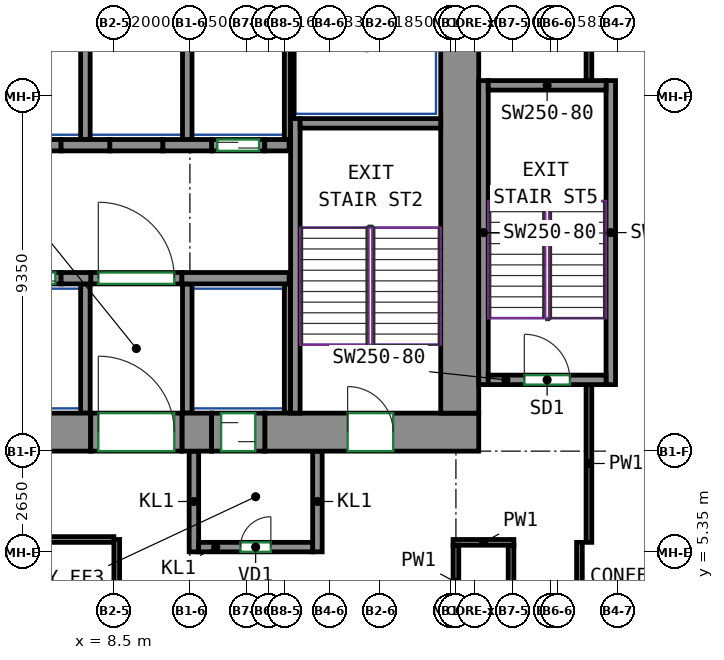
"""IFC4 building model, lengths in metres.
Left out: names, types, materials, properties, quantities, classifications, styles, units other than length and angle.
Written with IfcOpenShell. Run it as: python <this file> out.ifc"""

import sys

from ifc_helpers import new_model, si_unit, direction, frame, frame_2d, origin, place, context, subcontext, project, spatial, rectangle, extrude, source, transform, mapped, element, fill, save


model = new_model("IFC4")
c1 = context("Model", 3, precision=1e-05, world=origin(), true_north=direction((0.0, 1.0)))
c2 = subcontext(c1, "Body", "Model", "MODEL_VIEW")
j1 = project(units=[si_unit("LENGTHUNIT", "METRE"), si_unit("PLANEANGLEUNIT", "RADIAN")], contexts=[c1])
p1 = place(None, origin())
s1 = spatial("IfcSite", under=j1, at=p1, CompositionType="ELEMENT")
p2 = place(p1, origin())
s2 = spatial("IfcBuilding", under=s1, at=p2, CompositionType="ELEMENT")
p3 = place(p2, frame((0.0, 0.0, 55.0)))
s3 = spatial("IfcBuildingStorey", under=s2, at=p3, CompositionType="ELEMENT", Elevation=55.0)
m1 = source(origin(), c2, "Body", "SweptSolid", [
    extrude(rectangle(XDim=14.18, YDim=1.0, at=frame_2d((7.09, 0.0))), origin(), (0.0, 0.0, 1.0), 3.6),
])
p4 = place(p3, frame((-6.29, 8.5, 0.0), z_axis=(0.0, 0.0, 1.0), x_axis=(1.0, 0.0, 0.0)))
e1 = element("IfcWall", 1, at=p4, inside=s3, PredefinedType="SHEAR", context=c2, shape_type="MappedRepresentation", body=[
    mapped(m1, transform((0.0, 0.0, 0.0))),
])
m2 = source(origin(), c2, "Body", "SweptSolid", [
    extrude(rectangle(XDim=0.78, YDim=1.0, at=frame_2d((0.39, 0.0))), origin(), (0.0, 0.0, 1.0), 3.6),
])
p5 = place(p3, frame((10.29, 8.5, 0.0), z_axis=(0.0, 0.0, 1.0), x_axis=(1.0, 0.0, 0.0)))
e2 = element("IfcWall", 2, at=p5, inside=s3, PredefinedType="SHEAR", context=c2, shape_type="MappedRepresentation", body=[
    mapped(m2, transform((0.0, 0.0, 0.0))),
])
m3 = source(origin(), c2, "Body", "SweptSolid", [
    extrude(rectangle(XDim=5.63, YDim=1.0, at=frame_2d((2.815, 0.0))), origin(), (0.0, 0.0, 1.0), 3.6),
])
p6 = place(p3, frame((12.47, 8.5, 0.0), z_axis=(0.0, 0.0, 1.0), x_axis=(1.0, 0.0, 0.0)))
e3 = element("IfcWall", 3, at=p6, inside=s3, PredefinedType="SHEAR", context=c2, shape_type="MappedRepresentation", body=[
    mapped(m3, transform((0.0, 0.0, 0.0))),
])
p7 = place(p6, frame((2.18, 0.0, 0.0)))
e4 = element("IfcOpeningElement", 4, at=p7, cuts=e3, PredefinedType="OPENING", context=c2, shape_type="SweptSolid", body=[
    extrude(rectangle(XDim=1.2, YDim=2.1, at=frame_2d((0.6, 1.05))), frame((0.0, 0.51, 0.0), z_axis=(0.0, -1.0, 0.0), x_axis=(1.0, 0.0, 0.0)), (0.0, 0.0, 1.0), 1.02),
])
m4 = source(origin(), c2, "Body", "SweptSolid", [
    extrude(rectangle(XDim=12.0, YDim=1.0, at=frame_2d((6.0, 0.0))), origin(), (0.0, 0.0, 1.0), 3.6),
])
p8 = place(p3, frame((17.6, 9.0, 0.0), z_axis=(0.0, 0.0, 1.0), x_axis=(0.0, 1.0, 0.0)))
e5 = element("IfcWall", 5, at=p8, inside=s3, PredefinedType="SHEAR", context=c2, shape_type="MappedRepresentation", body=[
    mapped(m4, transform((0.0, 0.0, 0.0))),
])
m5 = source(origin(), c2, "Body", "SweptSolid", [
    extrude(rectangle(XDim=7.75, YDim=0.25, at=frame_2d((3.875, 0.0))), origin(), (0.0, 0.0, 1.0), 3.6),
])
p9 = place(p3, frame((13.275, 9.0, 0.0), z_axis=(0.0, 0.0, 1.0), x_axis=(0.0, 1.0, 0.0)))
e6 = element("IfcWall", 6, at=p9, inside=s3, PredefinedType="SHEAR", context=c2, shape_type="MappedRepresentation", body=[
    mapped(m5, transform((0.0, 0.0, 0.0))),
])
m6 = source(origin(), c2, "Body", "SweptSolid", [
    extrude(rectangle(XDim=3.7, YDim=0.25, at=frame_2d((1.85, 0.0))), origin(), (0.0, 0.0, 1.0), 3.6),
])
p10 = place(p3, frame((13.4, 16.625, 0.0), z_axis=(0.0, 0.0, 1.0), x_axis=(1.0, 0.0, 0.0)))
e7 = element("IfcWall", 7, at=p10, inside=s3, PredefinedType="SHEAR", context=c2, shape_type="MappedRepresentation", body=[
    mapped(m6, transform((0.0, 0.0, 0.0))),
])
m7 = source(origin(), c2, "Body", "SweptSolid", [
    extrude(rectangle(XDim=8.0, YDim=0.25, at=frame_2d((4.0, 0.0))), origin(), (0.0, 0.0, 1.0), 3.6),
])
for number, where, z_axis, x_axis in (
    (8, (18.225, 9.75, 0.0), (0.0, 0.0, 1.0), (0.0, 1.0, 0.0)),
    (9, (21.575, 9.75, 0.0), (0.0, 0.0, 1.0), (0.0, 1.0, 0.0)),
):
    element("IfcWall", number, at=place(p3, frame(where, z_axis=z_axis, x_axis=x_axis)), inside=s3, PredefinedType="SHEAR", context=c2, shape_type="MappedRepresentation", body=[
        mapped(m7, transform((0.0, 0.0, 0.0))),
    ])
m8 = source(origin(), c2, "Body", "SweptSolid", [
    extrude(rectangle(XDim=3.1, YDim=0.25, at=frame_2d((1.55, 0.0))), origin(), (0.0, 0.0, 1.0), 3.6),
])
p11 = place(p3, frame((18.35, 9.875, 0.0), z_axis=(0.0, 0.0, 1.0), x_axis=(1.0, 0.0, 0.0)))
e10 = element("IfcWall", 10, at=p11, inside=s3, PredefinedType="SHEAR", context=c2, shape_type="MappedRepresentation", body=[
    mapped(m8, transform((0.0, 0.0, 0.0))),
])
p12 = place(p11, frame((0.95, 0.0, 0.0)))
e11 = element("IfcOpeningElement", 11, at=p12, cuts=e10, PredefinedType="OPENING", context=c2, shape_type="SweptSolid", body=[
    extrude(rectangle(XDim=1.2, YDim=2.1, at=frame_2d((0.6, 1.05))), frame((0.0, 0.135, 0.0), z_axis=(0.0, -1.0, 0.0), x_axis=(1.0, 0.0, 0.0)), (0.0, 0.0, 1.0), 0.27),
])
p13 = place(p3, frame((18.35, 17.625, 0.0), z_axis=(0.0, 0.0, 1.0), x_axis=(1.0, 0.0, 0.0)))
e12 = element("IfcWall", 12, at=p13, inside=s3, PredefinedType="SHEAR", context=c2, shape_type="MappedRepresentation", body=[
    mapped(m8, transform((0.0, 0.0, 0.0))),
])
m9 = source(origin(), c2, "Body", "SweptSolid", [
    extrude(rectangle(XDim=0.78, YDim=0.3, at=frame_2d((0.39, 0.0))), origin(), (0.0, 0.0, 1.0), 3.6),
])
p14 = place(p3, frame((7.11, 12.55, 0.0), z_axis=(0.0, 0.0, 1.0), x_axis=(1.0, 0.0, 0.0)))
e13 = element("IfcWall", 13, at=p14, inside=s3, PredefinedType="SHEAR", context=c2, shape_type="MappedRepresentation", body=[
    mapped(m9, transform((0.0, 0.0, 0.0))),
])
m10 = source(origin(), c2, "Body", "SweptSolid", [
    extrude(rectangle(XDim=2.82, YDim=0.3, at=frame_2d((1.41, 0.0))), origin(), (0.0, 0.0, 1.0), 3.6),
])
p15 = place(p3, frame((10.29, 12.55, 0.0), z_axis=(0.0, 0.0, 1.0), x_axis=(1.0, 0.0, 0.0)))
e14 = element("IfcWall", 14, at=p15, inside=s3, PredefinedType="SHEAR", context=c2, shape_type="MappedRepresentation", body=[
    mapped(m10, transform((0.0, 0.0, 0.0))),
])
m11 = source(origin(), c2, "Body", "SweptSolid", [
    extrude(rectangle(XDim=1.28, YDim=0.3, at=frame_2d((0.64, 0.0))), origin(), (0.0, 0.0, 1.0), 3.6),
])
p16 = place(p3, frame((7.11, 16.05, 0.0), z_axis=(0.0, 0.0, 1.0), x_axis=(1.0, 0.0, 0.0)))
e15 = element("IfcWall", 15, at=p16, inside=s3, PredefinedType="SHEAR", context=c2, shape_type="MappedRepresentation", body=[
    mapped(m11, transform((0.0, 0.0, 0.0))),
])
m12 = source(origin(), c2, "Body", "SweptSolid", [
    extrude(rectangle(XDim=1.28, YDim=0.3, at=frame_2d((0.64, 0.0))), origin(), (0.0, 0.0, 1.0), 3.6),
])
p17 = place(p3, frame((9.79, 16.05, 0.0), z_axis=(0.0, 0.0, 1.0), x_axis=(1.0, 0.0, 0.0)))
e16 = element("IfcWall", 16, at=p17, inside=s3, PredefinedType="SHEAR", context=c2, shape_type="MappedRepresentation", body=[
    mapped(m12, transform((0.0, 0.0, 0.0))),
])
m13 = source(origin(), c2, "Body", "SweptSolid", [
    extrude(rectangle(XDim=0.64, YDim=0.3, at=frame_2d((0.32, 0.0))), origin(), (0.0, 0.0, 1.0), 3.6),
])
p18 = place(p3, frame((12.47, 16.05, 0.0), z_axis=(0.0, 0.0, 1.0), x_axis=(1.0, 0.0, 0.0)))
e17 = element("IfcWall", 17, at=p18, inside=s3, PredefinedType="SHEAR", context=c2, shape_type="MappedRepresentation", body=[
    mapped(m13, transform((0.0, 0.0, 0.0))),
])
m14 = source(origin(), c2, "Body", "SweptSolid", [
    extrude(rectangle(XDim=1.4, YDim=0.3, at=frame_2d((0.7, 0.0))), origin(), (0.0, 0.0, 1.0), 3.6),
])
p19 = place(p3, frame((5.71, 12.55, 0.0), z_axis=(0.0, 0.0, 1.0), x_axis=(1.0, 0.0, 0.0)))
e18 = element("IfcWall", 18, at=p19, inside=s3, PredefinedType="PARTITIONING", context=c2, shape_type="MappedRepresentation", body=[
    mapped(m14, transform((0.0, 0.0, 0.0))),
])
p20 = place(p19, frame((0.15, 0.0, 0.0)))
e19 = element("IfcOpeningElement", 19, at=p20, cuts=e18, PredefinedType="OPENING", context=c2, shape_type="SweptSolid", body=[
    extrude(rectangle(XDim=1.1, YDim=2.1, at=frame_2d((0.55, 1.05))), frame((0.0, 0.16, 0.0), z_axis=(0.0, -1.0, 0.0), x_axis=(1.0, 0.0, 0.0)), (0.0, 0.0, 1.0), 0.32),
])
m15 = source(origin(), c2, "Body", "SweptSolid", [
    extrude(rectangle(XDim=1.4, YDim=0.3, at=frame_2d((0.7, 0.0))), origin(), (0.0, 0.0, 1.0), 3.6),
])
p21 = place(p3, frame((11.07, 16.05, 0.0), z_axis=(0.0, 0.0, 1.0), x_axis=(1.0, 0.0, 0.0)))
e20 = element("IfcWall", 20, at=p21, inside=s3, PredefinedType="PARTITIONING", context=c2, shape_type="MappedRepresentation", body=[
    mapped(m15, transform((0.0, 0.0, 0.0))),
])
p22 = place(p21, frame((0.15, 0.0, 0.0)))
e21 = element("IfcOpeningElement", 21, at=p22, cuts=e20, PredefinedType="OPENING", context=c2, shape_type="SweptSolid", body=[
    extrude(rectangle(XDim=1.1, YDim=2.1, at=frame_2d((0.55, 1.05))), frame((0.0, 0.16, 0.0), z_axis=(0.0, -1.0, 0.0), x_axis=(1.0, 0.0, 0.0)), (0.0, 0.0, 1.0), 0.32),
])
m16 = source(origin(), c2, "Body", "SweptSolid", [
    extrude(rectangle(XDim=2.4, YDim=0.3, at=frame_2d((1.2, 0.0))), origin(), (0.0, 0.0, 1.0), 3.6),
])
p23 = place(p3, frame((7.89, 12.55, 0.0), z_axis=(0.0, 0.0, 1.0), x_axis=(1.0, 0.0, 0.0)))
e22 = element("IfcWall", 22, at=p23, inside=s3, PredefinedType="PARTITIONING", context=c2, shape_type="MappedRepresentation", body=[
    mapped(m16, transform((0.0, 0.0, 0.0))),
])
p24 = place(p23, frame((0.2, 0.0, 0.0)))
e23 = element("IfcOpeningElement", 23, at=p24, cuts=e22, PredefinedType="OPENING", context=c2, shape_type="SweptSolid", body=[
    extrude(rectangle(XDim=2.0, YDim=2.1, at=frame_2d((1.0, 1.05))), frame((0.0, 0.16, 0.0), z_axis=(0.0, -1.0, 0.0), x_axis=(1.0, 0.0, 0.0)), (0.0, 0.0, 1.0), 0.32),
])
for number, where, z_axis, x_axis in (
    (24, (5.71, 16.05, 0.0), (0.0, 0.0, 1.0), (1.0, 0.0, 0.0)),
    (25, (8.39, 16.05, 0.0), (0.0, 0.0, 1.0), (1.0, 0.0, 0.0)),
):
    element("IfcWall", number, at=place(p3, frame(where, z_axis=z_axis, x_axis=x_axis)), inside=s3, PredefinedType="PARTITIONING", context=c2, shape_type="MappedRepresentation", body=[
        mapped(m14, transform((0.0, 0.0, 0.0))),
    ])
m17 = source(origin(), c2, "Body", "SweptSolid", [
    extrude(rectangle(XDim=2.65, YDim=0.25, at=frame_2d((1.325, 0.0))), origin(), (0.0, 0.0, 1.0), 3.6),
])
for number, where, z_axis, x_axis in (
    (26, (10.605, 5.35, 0.0), (0.0, 0.0, 1.0), (0.0, 1.0, 0.0)),
    (27, (13.855, 5.35, 0.0), (0.0, 0.0, 1.0), (0.0, 1.0, 0.0)),
):
    element("IfcWall", number, at=place(p3, frame(where, z_axis=z_axis, x_axis=x_axis)), inside=s3, PredefinedType="PARTITIONING", context=c2, shape_type="MappedRepresentation", body=[
        mapped(m17, transform((0.0, 0.0, 0.0))),
    ])
m18 = source(origin(), c2, "Body", "SweptSolid", [
    extrude(rectangle(XDim=3.0, YDim=0.25, at=frame_2d((1.5, 0.0))), origin(), (0.0, 0.0, 1.0), 3.6),
])
p25 = place(p3, frame((10.73, 5.475, 0.0), z_axis=(0.0, 0.0, 1.0), x_axis=(1.0, 0.0, 0.0)))
e28 = element("IfcWall", 28, at=p25, inside=s3, PredefinedType="PARTITIONING", context=c2, shape_type="MappedRepresentation", body=[
    mapped(m18, transform((0.0, 0.0, 0.0))),
])
p26 = place(p25, frame((1.1, 0.0, 0.0)))
e29 = element("IfcOpeningElement", 29, at=p26, cuts=e28, PredefinedType="OPENING", context=c2, shape_type="SweptSolid", body=[
    extrude(rectangle(XDim=0.8, YDim=2.0, at=frame_2d((0.4, 1.0))), frame((0.0, 0.135, 0.0), z_axis=(0.0, -1.0, 0.0), x_axis=(1.0, 0.0, 0.0)), (0.0, 0.0, 1.0), 0.27),
])
m19 = source(origin(), c2, "Body", "SweptSolid", [
    extrude(rectangle(XDim=3.275, YDim=0.165, at=frame_2d((1.638, 0.0))), origin(), (0.0, 0.0, 1.0), 3.6),
])
p27 = place(p3, frame((13.067, 16.2, 0.0), z_axis=(0.0, 0.0, 1.0), x_axis=(0.0, 1.0, 0.0)))
e30 = element("IfcWall", 30, at=p27, inside=s3, PredefinedType="PARTITIONING", context=c2, shape_type="MappedRepresentation", body=[
    mapped(m19, transform((0.0, 0.0, 0.0))),
])
m20 = source(origin(), c2, "Body", "SweptSolid", [
    extrude(rectangle(XDim=3.275, YDim=0.25, at=frame_2d((1.638, 0.0))), origin(), (0.0, 0.0, 1.0), 3.6),
])
p28 = place(p3, frame((10.43, 16.2, 0.0), z_axis=(0.0, 0.0, 1.0), x_axis=(0.0, 1.0, 0.0)))
e31 = element("IfcWall", 31, at=p28, inside=s3, PredefinedType="PARTITIONING", context=c2, shape_type="MappedRepresentation", body=[
    mapped(m20, transform((0.0, 0.0, 0.0))),
])
m21 = source(origin(), c2, "Body", "SweptSolid", [
    extrude(rectangle(XDim=2.725, YDim=0.085, at=frame_2d((1.363, 0.0))), origin(), (0.0, 0.0, 1.0), 3.6),
])
p29 = place(p3, frame((13.192, 16.75, 0.0), z_axis=(0.0, 0.0, 1.0), x_axis=(0.0, 1.0, 0.0)))
e32 = element("IfcWall", 32, at=p29, inside=s3, PredefinedType="PARTITIONING", context=c2, shape_type="MappedRepresentation", body=[
    mapped(m21, transform((0.0, 0.0, 0.0))),
])
p30 = place(p3, frame((7.75, 16.2, 0.0), z_axis=(0.0, 0.0, 1.0), x_axis=(0.0, 1.0, 0.0)))
e33 = element("IfcWall", 33, at=p30, inside=s3, PredefinedType="PARTITIONING", context=c2, shape_type="MappedRepresentation", body=[
    mapped(m20, transform((0.0, 0.0, 0.0))),
])
m22 = source(origin(), c2, "Body", "SweptSolid", [
    extrude(rectangle(XDim=3.4, YDim=0.25, at=frame_2d((1.7, 0.0))), origin(), (0.0, 0.0, 1.0), 3.6),
])
p31 = place(p3, frame((10.43, 9.0, 0.0), z_axis=(0.0, 0.0, 1.0), x_axis=(0.0, 1.0, 0.0)))
e34 = element("IfcWall", 34, at=p31, inside=s3, PredefinedType="PARTITIONING", context=c2, shape_type="MappedRepresentation", body=[
    mapped(m22, transform((0.0, 0.0, 0.0))),
])
m23 = source(origin(), c2, "Body", "SweptSolid", [
    extrude(rectangle(XDim=3.4, YDim=0.165, at=frame_2d((1.7, 0.0))), origin(), (0.0, 0.0, 1.0), 3.6),
])
p32 = place(p3, frame((13.067, 9.0, 0.0), z_axis=(0.0, 0.0, 1.0), x_axis=(0.0, 1.0, 0.0)))
e35 = element("IfcWall", 35, at=p32, inside=s3, PredefinedType="PARTITIONING", context=c2, shape_type="MappedRepresentation", body=[
    mapped(m23, transform((0.0, 0.0, 0.0))),
])
p33 = place(p3, frame((7.75, 9.0, 0.0), z_axis=(0.0, 0.0, 1.0), x_axis=(0.0, 1.0, 0.0)))
e36 = element("IfcWall", 36, at=p33, inside=s3, PredefinedType="PARTITIONING", context=c2, shape_type="MappedRepresentation", body=[
    mapped(m22, transform((0.0, 0.0, 0.0))),
])
m24 = source(origin(), c2, "Body", "SweptSolid", [
    extrude(rectangle(XDim=2.4, YDim=1.0, at=frame_2d((1.2, 0.0))), origin(), (0.0, 0.0, 1.0), 2.7),
])
p34 = place(p3, frame((7.89, 8.5, 0.0), z_axis=(0.0, 0.0, 1.0), x_axis=(1.0, 0.0, 0.0)))
e37 = element("IfcWall", 37, at=p34, inside=s3, PredefinedType="PARTITIONING", context=c2, shape_type="MappedRepresentation", body=[
    mapped(m24, transform((0.0, 0.0, 0.0))),
])
p35 = place(p34, frame((0.2, 0.0, 0.0)))
e38 = element("IfcOpeningElement", 38, at=p35, cuts=e37, PredefinedType="OPENING", context=c2, shape_type="SweptSolid", body=[
    extrude(rectangle(XDim=2.0, YDim=2.1, at=frame_2d((1.0, 1.05))), frame((0.0, 0.51, 0.0), z_axis=(0.0, -1.0, 0.0), x_axis=(1.0, 0.0, 0.0)), (0.0, 0.0, 1.0), 1.02),
])
m25 = source(origin(), c2, "Body", "SweptSolid", [
    extrude(rectangle(XDim=1.4, YDim=1.0, at=frame_2d((0.7, 0.0))), origin(), (0.0, 0.0, 1.0), 2.7),
])
p36 = place(p3, frame((11.07, 8.5, 0.0), z_axis=(0.0, 0.0, 1.0), x_axis=(1.0, 0.0, 0.0)))
e39 = element("IfcWall", 39, at=p36, inside=s3, PredefinedType="PARTITIONING", context=c2, shape_type="MappedRepresentation", body=[
    mapped(m25, transform((0.0, 0.0, 0.0))),
])
p37 = place(p36, frame((0.25, 0.0, 0.0)))
e40 = element("IfcOpeningElement", 40, at=p37, cuts=e39, PredefinedType="OPENING", context=c2, shape_type="SweptSolid", body=[
    extrude(rectangle(XDim=0.9, YDim=2.1, at=frame_2d((0.45, 1.05))), frame((0.0, 0.51, 0.0), z_axis=(0.0, -1.0, 0.0), x_axis=(1.0, 0.0, 0.0)), (0.0, 0.0, 1.0), 1.02),
])
p38 = place(p3, frame((20.75, -7.75, 0.0), z_axis=(0.0, 0.0, 1.0), x_axis=(0.0, 1.0, 0.0)))
e41 = element("IfcWall", 41, at=p38, inside=s3, PredefinedType="PARTITIONING", context=c2, shape_type="SweptSolid", body=[
    extrude(rectangle(XDim=13.35, YDim=0.15, at=frame_2d((6.675, 0.0))), origin(), (0.0, 0.0, 1.0), 3.6),
])
p39 = place(p38, frame((6.744, 0.0, 0.0)))
e42 = element("IfcOpeningElement", 42, at=p39, cuts=e41, PredefinedType="OPENING", context=c2, shape_type="SweptSolid", body=[
    extrude(rectangle(XDim=0.9, YDim=2.1, at=frame_2d((0.45, 1.05))), frame((0.0, 0.085, 0.0), z_axis=(0.0, -1.0, 0.0), x_axis=(1.0, 0.0, 0.0)), (0.0, 0.0, 1.0), 0.17),
])
p40 = place(p3, frame((18.95, -0.91, 0.0), z_axis=(0.0, 0.0, 1.0), x_axis=(0.0, 1.0, 0.0)))
e43 = element("IfcWall", 43, at=p40, inside=s3, PredefinedType="PARTITIONING", context=c2, shape_type="SweptSolid", body=[
    extrude(rectangle(XDim=6.435, YDim=0.15, at=frame_2d((3.217, 0.0))), origin(), (0.0, 0.0, 1.0), 3.6),
])
p41 = place(p3, frame((17.425, 5.6, 0.0), z_axis=(0.0, 0.0, 1.0), x_axis=(1.0, 0.0, 0.0)))
e44 = element("IfcWall", 44, at=p41, inside=s3, PredefinedType="PARTITIONING", context=c2, shape_type="SweptSolid", body=[
    extrude(rectangle(XDim=1.6, YDim=0.15, at=frame_2d((0.8, 0.0))), origin(), (0.0, 0.0, 1.0), 3.6),
])
p42 = place(p3, frame((17.5, 3.575, 0.0), z_axis=(0.0, 0.0, 1.0), x_axis=(0.0, 1.0, 0.0)))
e45 = element("IfcWall", 45, at=p42, inside=s3, PredefinedType="PARTITIONING", context=c2, shape_type="SweptSolid", body=[
    extrude(rectangle(XDim=1.95, YDim=0.15, at=frame_2d((0.975, 0.0))), origin(), (0.0, 0.0, 1.0), 3.6),
])
p43 = place(p3, frame((21.0, 17.75, 0.0), z_axis=(0.0, 0.0, 1.0), x_axis=(0.0, 1.0, 0.0)))
e46 = element("IfcWall", 46, at=p43, inside=s3, PredefinedType="PARTITIONING", context=c2, shape_type="SweptSolid", body=[
    extrude(rectangle(XDim=4.16, YDim=0.15, at=frame_2d((2.08, 0.0))), origin(), (0.0, 0.0, 1.0), 3.6),
])
p44 = place(p3, frame((21.0, 5.6, 0.0), z_axis=(0.0, 0.0, 1.0), x_axis=(0.0, 1.0, 0.0)))
e47 = element("IfcWall", 47, at=p44, inside=s3, PredefinedType="PARTITIONING", context=c2, shape_type="SweptSolid", body=[
    extrude(rectangle(XDim=4.15, YDim=0.15, at=frame_2d((2.075, 0.0))), origin(), (0.0, 0.0, 1.0), 3.6),
])
p45 = place(p3, frame((-6.575, 5.675, 0.0), z_axis=(0.0, 0.0, 1.0), x_axis=(1.0, 0.0, 0.0)))
e48 = element("IfcWall", 48, at=p45, inside=s3, PredefinedType="PARTITIONING", context=c2, shape_type="SweptSolid", body=[
    extrude(rectangle(XDim=15.075, YDim=0.15, at=frame_2d((7.538, 0.0))), origin(), (0.0, 0.0, 1.0), 3.6),
])
p46 = place(p3, frame((8.575, 5.675, 0.0), z_axis=(0.0, 0.0, 1.0), x_axis=(0.0, -1.0, 0.0)))
e49 = element("IfcWall", 49, at=p46, inside=s3, PredefinedType="PARTITIONING", context=c2, shape_type="SweptSolid", body=[
    extrude(rectangle(XDim=15.15, YDim=0.15, at=frame_2d((7.575, 0.0))), origin(), (0.0, 0.0, 1.0), 3.6),
])
p47 = place(p24, origin())
e50 = element("IfcDoor", 50, at=p47, inside=s3, OperationType="DOUBLE_DOOR_SINGLE_SWING", PredefinedType="DOOR", context=c2, shape_type="SweptSolid", body=[
    extrude(rectangle(XDim=2.0, YDim=2.1, at=frame_2d((1.0, 1.05))), frame((0.0, 0.025, 0.0), z_axis=(0.0, -1.0, 0.0), x_axis=(1.0, 0.0, 0.0)), (0.0, 0.0, 1.0), 0.05),
])
fill(e23, e50)
p48 = place(p35, origin())
e51 = element("IfcDoor", 51, at=p48, inside=s3, OperationType="DOUBLE_DOOR_SINGLE_SWING", PredefinedType="DOOR", context=c2, shape_type="SweptSolid", body=[
    extrude(rectangle(XDim=2.0, YDim=2.1, at=frame_2d((1.0, 1.05))), frame((0.0, 0.405, 0.0), z_axis=(0.0, -1.0, 0.0), x_axis=(1.0, 0.0, 0.0)), (0.0, 0.0, 1.0), 0.05),
])
fill(e38, e51)
p49 = place(p26, origin())
e52 = element("IfcDoor", 52, at=p49, inside=s3, OperationType="SINGLE_SWING_RIGHT", PredefinedType="DOOR", context=c2, shape_type="SweptSolid", body=[
    extrude(rectangle(XDim=0.8, YDim=2.0, at=frame_2d((0.4, 1.0))), frame((0.0, 0.025, 0.0), z_axis=(0.0, -1.0, 0.0), x_axis=(1.0, 0.0, 0.0)), (0.0, 0.0, 1.0), 0.05),
])
fill(e29, e52)
p50 = place(p37, origin())
e53 = element("IfcDoor", 53, at=p50, inside=s3, OperationType="SLIDING_TO_LEFT", PredefinedType="DOOR", context=c2, shape_type="SweptSolid", body=[
    extrude(rectangle(XDim=0.9, YDim=2.1, at=frame_2d((0.45, 1.05))), frame((0.0, 0.405, 0.0), z_axis=(0.0, -1.0, 0.0), x_axis=(1.0, 0.0, 0.0)), (0.0, 0.0, 1.0), 0.05),
])
fill(e40, e53)
p51 = place(p20, origin())
e54 = element("IfcDoor", 54, at=p51, inside=s3, OperationType="DOUBLE_DOOR_SLIDING", PredefinedType="DOOR", context=c2, shape_type="SweptSolid", body=[
    extrude(rectangle(XDim=1.1, YDim=2.1, at=frame_2d((0.55, 1.05))), frame((0.0, 0.025, 0.0), z_axis=(0.0, -1.0, 0.0), x_axis=(1.0, 0.0, 0.0)), (0.0, 0.0, 1.0), 0.05),
])
fill(e19, e54)
p52 = place(p22, origin())
e55 = element("IfcDoor", 55, at=p52, inside=s3, OperationType="DOUBLE_DOOR_SLIDING", PredefinedType="DOOR", context=c2, shape_type="SweptSolid", body=[
    extrude(rectangle(XDim=1.1, YDim=2.1, at=frame_2d((0.55, 1.05))), frame((0.0, 0.025, 0.0), z_axis=(0.0, -1.0, 0.0), x_axis=(1.0, 0.0, 0.0)), (0.0, 0.0, 1.0), 0.05),
])
fill(e21, e55)
p53 = place(p7, origin())
e56 = element("IfcDoor", 56, at=p53, inside=s3, OperationType="DOUBLE_DOOR_SINGLE_SWING", PredefinedType="DOOR", context=c2, shape_type="SweptSolid", body=[
    extrude(rectangle(XDim=1.2, YDim=2.1, at=frame_2d((0.6, 1.05))), frame((0.0, 0.405, 0.0), z_axis=(0.0, -1.0, 0.0), x_axis=(1.0, 0.0, 0.0)), (0.0, 0.0, 1.0), 0.05),
])
fill(e4, e56)
p54 = place(p12, origin())
e57 = element("IfcDoor", 57, at=p54, inside=s3, OperationType="DOUBLE_DOOR_SINGLE_SWING", PredefinedType="DOOR", context=c2, shape_type="SweptSolid", body=[
    extrude(rectangle(XDim=1.2, YDim=2.1, at=frame_2d((0.6, 1.05))), frame((0.0, 0.025, 0.0), z_axis=(0.0, -1.0, 0.0), x_axis=(1.0, 0.0, 0.0)), (0.0, 0.0, 1.0), 0.05),
])
fill(e11, e57)
save(model, sys.argv[1])
